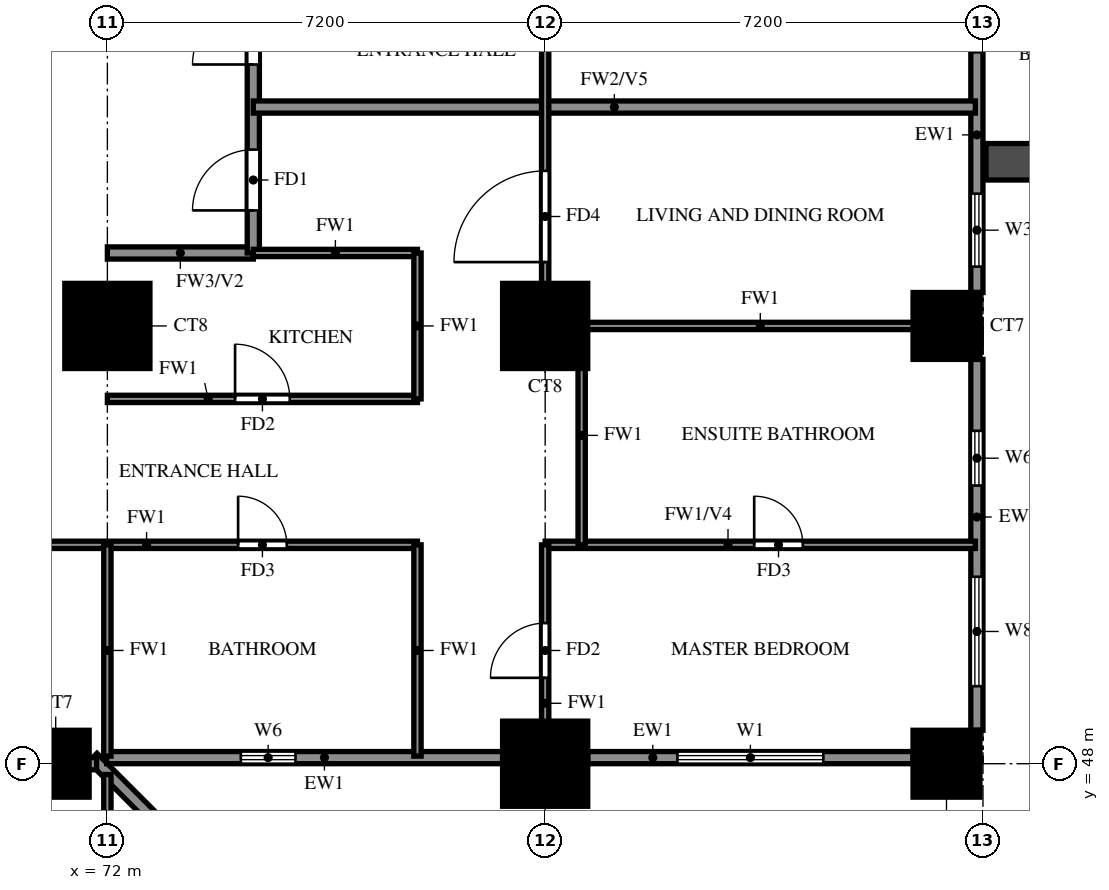
"""IFC4 building model, lengths in metres.
Left out: names, types, materials, properties, quantities, classifications, styles, units other than length and angle.
Written with IfcOpenShell. Run it as: python <this file> out.ifc"""

import sys

from ifc_helpers import new_model, si_unit, direction, frame, frame_2d, origin, origin_2d, place, context, subcontext, project, spatial, rectangle, extrude, source, transform, mapped, element, fill, save


model = new_model("IFC4")
c1 = context("Model", 3, precision=1e-05, world=origin(), true_north=direction((0.0, 1.0)))
c2 = subcontext(c1, "Body", "Model", "MODEL_VIEW")
j1 = project(units=[si_unit("LENGTHUNIT", "METRE"), si_unit("PLANEANGLEUNIT", "RADIAN")], contexts=[c1])
p1 = place(None, origin())
s1 = spatial("IfcSite", under=j1, at=p1, CompositionType="ELEMENT")
p2 = place(p1, origin())
s2 = spatial("IfcBuilding", under=s1, at=p2, CompositionType="ELEMENT")
p3 = place(p2, frame((0.0, 0.0, 34.0)))
s3 = spatial("IfcBuildingStorey", under=s2, at=p3, CompositionType="ELEMENT", Elevation=34.0)
m1 = source(origin(), c2, "Body", "SweptSolid", [
    extrude(rectangle(XDim=1.1, YDim=1.1, at=origin_2d()), origin(), (0.0, 0.0, 1.0), 3.18),
])
p4 = place(p3, frame((71.15, 48.0, 0.0), z_axis=(0.0, 0.0, 1.0), x_axis=(1.0, 0.0, 0.0)))
e1 = element("IfcColumn", 1, at=p4, inside=s3, PredefinedType="COLUMN", context=c2, shape_type="MappedRepresentation", body=[
    mapped(m1, transform((0.0, 0.0, 0.0))),
])
m2 = source(origin(), c2, "Body", "SweptSolid", [
    extrude(rectangle(XDim=1.4, YDim=1.4, at=origin_2d()), origin(), (0.0, 0.0, 1.0), 3.18),
])
p5 = place(p3, frame((79.2, 48.0, 0.0), z_axis=(0.0, 0.0, 1.0), x_axis=(1.0, 0.0, 0.0)))
e2 = element("IfcColumn", 2, at=p5, inside=s3, PredefinedType="COLUMN", context=c2, shape_type="MappedRepresentation", body=[
    mapped(m2, transform((0.0, 0.0, 0.0))),
])
p6 = place(p3, frame((85.8, 48.0, 0.0), z_axis=(0.0, 0.0, 1.0), x_axis=(1.0, 0.0, 0.0)))
e3 = element("IfcColumn", 3, at=p6, inside=s3, PredefinedType="COLUMN", context=c2, shape_type="MappedRepresentation", body=[
    mapped(m1, transform((0.0, 0.0, 0.0))),
])
for number, where, z_axis, x_axis in (
    (4, (72.0, 55.2, 0.0), (0.0, 0.0, 1.0), (1.0, 0.0, 0.0)),
    (5, (79.2, 55.2, 0.0), (0.0, 0.0, 1.0), (1.0, 0.0, 0.0)),
):
    element("IfcColumn", number, at=place(p3, frame(where, z_axis=z_axis, x_axis=x_axis)), inside=s3, PredefinedType="COLUMN", context=c2, shape_type="MappedRepresentation", body=[
        mapped(m2, transform((0.0, 0.0, 0.0))),
    ])
p7 = place(p3, frame((85.8, 55.2, 0.0), z_axis=(0.0, 0.0, 1.0), x_axis=(1.0, 0.0, 0.0)))
e6 = element("IfcColumn", 6, at=p7, inside=s3, PredefinedType="COLUMN", context=c2, shape_type="MappedRepresentation", body=[
    mapped(m1, transform((0.0, 0.0, 0.0))),
])
p8 = place(p3, frame((78.74, 41.118, 0.0), z_axis=(0.0, 0.0, 1.0), x_axis=(-0.707106781187, 0.707106781187, 0.0)))
e7 = element("IfcWall", 7, at=p8, inside=s3, PredefinedType="SOLIDWALL", context=c2, shape_type="SweptSolid", body=[
    extrude(rectangle(XDim=9.874, YDim=0.2, at=frame_2d((4.937, 0.0))), origin(), (0.0, 0.0, 1.0), 3.18),
])
p9 = place(p3, frame((71.989, 48.1, 0.0), z_axis=(0.0, 0.0, 1.0), x_axis=(1.0, 0.0, 0.0)))
e8 = element("IfcWall", 8, at=p9, inside=s3, PredefinedType="SOLIDWALL", context=c2, shape_type="SweptSolid", body=[
    extrude(rectangle(XDim=6.511, YDim=0.2, at=frame_2d((3.256, 0.0))), origin(), (0.0, 0.0, 1.0), 3.18),
])
p10 = place(p9, frame((2.206, 0.0, 1.5)))
e9 = element("IfcOpeningElement", 9, at=p10, cuts=e8, PredefinedType="OPENING", context=c2, shape_type="SweptSolid", body=[
    extrude(rectangle(XDim=0.9, YDim=0.9, at=frame_2d((0.45, 0.45))), frame((0.0, 0.11, 0.0), z_axis=(0.0, -1.0, 0.0), x_axis=(1.0, 0.0, 0.0)), (0.0, 0.0, 1.0), 0.22),
])
p11 = place(p3, frame((79.9, 48.1, 0.0), z_axis=(0.0, 0.0, 1.0), x_axis=(1.0, 0.0, 0.0)))
e10 = element("IfcWall", 10, at=p11, inside=s3, PredefinedType="SOLIDWALL", context=c2, shape_type="SweptSolid", body=[
    extrude(rectangle(XDim=5.35, YDim=0.2, at=frame_2d((2.675, 0.0))), origin(), (0.0, 0.0, 1.0), 3.18),
])
p12 = place(p11, frame((1.475, 0.0, 0.6)))
e11 = element("IfcOpeningElement", 11, at=p12, cuts=e10, PredefinedType="OPENING", context=c2, shape_type="SweptSolid", body=[
    extrude(rectangle(XDim=2.4, YDim=2.4, at=frame_2d((1.2, 1.2))), frame((0.0, 0.11, 0.0), z_axis=(0.0, -1.0, 0.0), x_axis=(1.0, 0.0, 0.0)), (0.0, 0.0, 1.0), 0.22),
])
p13 = place(p3, frame((86.3, 48.55, 0.0), z_axis=(0.0, 0.0, 1.0), x_axis=(0.0, 1.0, 0.0)))
e12 = element("IfcWall", 12, at=p13, inside=s3, PredefinedType="SOLIDWALL", context=c2, shape_type="SweptSolid", body=[
    extrude(rectangle(XDim=6.1, YDim=0.2, at=frame_2d((3.05, 0.0))), origin(), (0.0, 0.0, 1.0), 3.18),
])
p14 = place(p13, frame((0.725, 0.0, 0.6)))
e13 = element("IfcOpeningElement", 13, at=p14, cuts=e12, PredefinedType="OPENING", context=c2, shape_type="SweptSolid", body=[
    extrude(rectangle(XDim=1.8, YDim=2.4, at=frame_2d((0.9, 1.2))), frame((0.0, 0.11, 0.0), z_axis=(0.0, -1.0, 0.0), x_axis=(1.0, 0.0, 0.0)), (0.0, 0.0, 1.0), 0.22),
])
p15 = place(p13, frame((4.025, 0.0, 1.5)))
e14 = element("IfcOpeningElement", 14, at=p15, cuts=e12, PredefinedType="OPENING", context=c2, shape_type="SweptSolid", body=[
    extrude(rectangle(XDim=0.9, YDim=0.9, at=frame_2d((0.45, 0.45))), frame((0.0, 0.11, 0.0), z_axis=(0.0, -1.0, 0.0), x_axis=(1.0, 0.0, 0.0)), (0.0, 0.0, 1.0), 0.22),
])
p16 = place(p3, frame((86.3, 55.75, 0.0), z_axis=(0.0, 0.0, 1.0), x_axis=(0.0, 1.0, 0.0)))
e15 = element("IfcWall", 15, at=p16, inside=s3, PredefinedType="SOLIDWALL", context=c2, shape_type="SweptSolid", body=[
    extrude(rectangle(XDim=6.1, YDim=0.2, at=frame_2d((3.05, 0.0))), origin(), (0.0, 0.0, 1.0), 3.18),
])
p17 = place(p16, frame((3.95, 0.0, 0.0)))
e16 = element("IfcOpeningElement", 16, at=p17, cuts=e15, PredefinedType="OPENING", context=c2, shape_type="SweptSolid", body=[
    extrude(rectangle(XDim=1.8, YDim=2.4, at=frame_2d((0.9, 1.2))), frame((0.0, 0.11, 0.0), z_axis=(0.0, -1.0, 0.0), x_axis=(1.0, 0.0, 0.0)), (0.0, 0.0, 1.0), 0.22),
])
p18 = place(p16, frame((0.425, 0.0, 0.6)))
e17 = element("IfcOpeningElement", 17, at=p18, cuts=e15, PredefinedType="OPENING", context=c2, shape_type="SweptSolid", body=[
    extrude(rectangle(XDim=1.2, YDim=2.4, at=frame_2d((0.6, 1.2))), frame((0.0, 0.11, 0.0), z_axis=(0.0, -1.0, 0.0), x_axis=(1.0, 0.0, 0.0)), (0.0, 0.0, 1.0), 0.22),
])
p19 = place(p3, frame((86.45, 57.9, 0.0), z_axis=(0.0, 0.0, 1.0), x_axis=(1.0, 0.0, 0.0)))
e18 = element("IfcWall", 18, at=p19, inside=s3, PredefinedType="SOLIDWALL", context=c2, shape_type="SweptSolid", body=[
    extrude(rectangle(XDim=2.65, YDim=0.6, at=frame_2d((1.325, 0.0))), origin(), (0.0, 0.0, 1.0), 2.85),
])
p20 = place(p3, frame((72.0, 56.4, 0.0), z_axis=(0.0, 0.0, 1.0), x_axis=(1.0, 0.0, 0.0)))
e19 = element("IfcWall", 19, at=p20, inside=s3, PredefinedType="SOLIDWALL", context=c2, shape_type="SweptSolid", body=[
    extrude(rectangle(XDim=2.4, YDim=0.2, at=frame_2d((1.2, 0.0))), origin(), (0.0, 0.0, 1.0), 3.18),
])
p21 = place(p3, frame((74.4, 56.4, 0.0), z_axis=(0.0, 0.0, 1.0), x_axis=(0.0, 1.0, 0.0)))
e20 = element("IfcWall", 20, at=p21, inside=s3, PredefinedType="SOLIDWALL", context=c2, shape_type="SweptSolid", body=[
    extrude(rectangle(XDim=9.6, YDim=0.2, at=frame_2d((4.8, 0.0))), origin(), (0.0, 0.0, 1.0), 3.18),
])
p22 = place(p21, frame((0.7, 0.0, 0.0)))
e21 = element("IfcOpeningElement", 21, at=p22, cuts=e20, PredefinedType="OPENING", context=c2, shape_type="SweptSolid", body=[
    extrude(rectangle(XDim=1.0, YDim=2.1, at=frame_2d((0.5, 1.05))), frame((0.0, 0.11, 0.0), z_axis=(0.0, -1.0, 0.0), x_axis=(1.0, 0.0, 0.0)), (0.0, 0.0, 1.0), 0.22),
])
p23 = place(p21, frame((3.1, 0.0, 0.0)))
e22 = element("IfcOpeningElement", 22, at=p23, cuts=e20, PredefinedType="OPENING", context=c2, shape_type="SweptSolid", body=[
    extrude(rectangle(XDim=1.0, YDim=2.1, at=frame_2d((0.5, 1.05))), frame((0.0, 0.11, 0.0), z_axis=(0.0, -1.0, 0.0), x_axis=(1.0, 0.0, 0.0)), (0.0, 0.0, 1.0), 0.22),
])
p24 = place(p3, frame((67.2, 48.0, 0.0), z_axis=(0.0, 0.0, 1.0), x_axis=(1.0, 0.0, 0.0)))
e23 = element("IfcWall", 23, at=p24, inside=s3, PredefinedType="SOLIDWALL", context=c2, shape_type="SweptSolid", body=[
    extrude(rectangle(XDim=4.623, YDim=0.2, at=frame_2d((2.312, 0.0))), origin(), (0.0, 0.0, 1.0), 3.18),
])
p25 = place(p3, frame((74.4, 58.8, 0.0), z_axis=(0.0, 0.0, 1.0), x_axis=(1.0, 0.0, 0.0)))
e24 = element("IfcWall", 24, at=p25, inside=s3, PredefinedType="SOLIDWALL", context=c2, shape_type="SweptSolid", body=[
    extrude(rectangle(XDim=11.875, YDim=0.2, at=frame_2d((5.938, 0.0))), origin(), (0.0, 0.0, 1.0), 2.28),
])
p26 = place(p3, frame((67.2, 51.6, 0.0), z_axis=(0.0, 0.0, 1.0), x_axis=(1.0, 0.0, 0.0)))
e25 = element("IfcWall", 25, at=p26, inside=s3, PredefinedType="PARTITIONING", context=c2, shape_type="SweptSolid", body=[
    extrude(rectangle(XDim=9.9, YDim=0.12, at=frame_2d((4.95, 0.0))), origin(), (0.0, 0.0, 1.0), 3.18),
])
p27 = place(p26, frame((6.95, 0.0, 0.0)))
e26 = element("IfcOpeningElement", 26, at=p27, cuts=e25, PredefinedType="OPENING", context=c2, shape_type="SweptSolid", body=[
    extrude(rectangle(XDim=0.8, YDim=2.1, at=frame_2d((0.4, 1.05))), frame((0.0, 0.07, 0.0), z_axis=(0.0, -1.0, 0.0), x_axis=(1.0, 0.0, 0.0)), (0.0, 0.0, 1.0), 0.14),
])
p28 = place(p26, frame((1.95, 0.0, 0.0)))
e27 = element("IfcOpeningElement", 27, at=p28, cuts=e25, PredefinedType="OPENING", context=c2, shape_type="SweptSolid", body=[
    extrude(rectangle(XDim=0.9, YDim=2.1, at=frame_2d((0.45, 1.05))), frame((0.0, 0.07, 0.0), z_axis=(0.0, -1.0, 0.0), x_axis=(1.0, 0.0, 0.0)), (0.0, 0.0, 1.0), 0.14),
])
p29 = place(p3, frame((79.2, 51.6, 0.0), z_axis=(0.0, 0.0, 1.0), x_axis=(1.0, 0.0, 0.0)))
e28 = element("IfcWall", 28, at=p29, inside=s3, PredefinedType="PARTITIONING", context=c2, shape_type="SweptSolid", body=[
    extrude(rectangle(XDim=7.075, YDim=0.12, at=frame_2d((3.538, 0.0))), origin(), (0.0, 0.0, 1.0), 2.28),
])
p30 = place(p29, frame((3.438, 0.0, 0.0)))
e29 = element("IfcOpeningElement", 29, at=p30, cuts=e28, PredefinedType="OPENING", context=c2, shape_type="SweptSolid", body=[
    extrude(rectangle(XDim=0.8, YDim=2.1, at=frame_2d((0.4, 1.05))), frame((0.0, 0.07, 0.0), z_axis=(0.0, -1.0, 0.0), x_axis=(1.0, 0.0, 0.0)), (0.0, 0.0, 1.0), 0.14),
])
p31 = place(p3, frame((72.0, 54.0, 0.0), z_axis=(0.0, 0.0, 1.0), x_axis=(1.0, 0.0, 0.0)))
e30 = element("IfcWall", 30, at=p31, inside=s3, PredefinedType="PARTITIONING", context=c2, shape_type="SweptSolid", body=[
    extrude(rectangle(XDim=5.1, YDim=0.12, at=frame_2d((2.55, 0.0))), origin(), (0.0, 0.0, 1.0), 3.18),
])
p32 = place(p31, frame((2.1, 0.0, 0.0)))
e31 = element("IfcOpeningElement", 31, at=p32, cuts=e30, PredefinedType="OPENING", context=c2, shape_type="SweptSolid", body=[
    extrude(rectangle(XDim=0.9, YDim=2.1, at=frame_2d((0.45, 1.05))), frame((0.0, 0.07, 0.0), z_axis=(0.0, -1.0, 0.0), x_axis=(1.0, 0.0, 0.0)), (0.0, 0.0, 1.0), 0.14),
])
p33 = place(p3, frame((79.2, 55.2, 0.0), z_axis=(0.0, 0.0, 1.0), x_axis=(1.0, 0.0, 0.0)))
e32 = element("IfcWall", 32, at=p33, inside=s3, PredefinedType="PARTITIONING", context=c2, shape_type="SweptSolid", body=[
    extrude(rectangle(XDim=7.075, YDim=0.12, at=frame_2d((3.538, 0.0))), origin(), (0.0, 0.0, 1.0), 3.18),
])
p34 = place(p3, frame((74.4, 56.4, 0.0), z_axis=(0.0, 0.0, 1.0), x_axis=(1.0, 0.0, 0.0)))
e33 = element("IfcWall", 33, at=p34, inside=s3, PredefinedType="PARTITIONING", context=c2, shape_type="SweptSolid", body=[
    extrude(rectangle(XDim=2.7, YDim=0.12, at=frame_2d((1.35, 0.0))), origin(), (0.0, 0.0, 1.0), 3.18),
])
p35 = place(p3, frame((72.0, 33.725, 0.0), z_axis=(0.0, 0.0, 1.0), x_axis=(0.0, 1.0, 0.0)))
e34 = element("IfcWall", 34, at=p35, inside=s3, PredefinedType="PARTITIONING", context=c2, shape_type="SweptSolid", body=[
    extrude(rectangle(XDim=14.098, YDim=0.12, at=frame_2d((7.049, 0.0))), origin(), (0.0, 0.0, 1.0), 2.28),
])
p36 = place(p35, frame((10.075, 0.0, 0.0)))
e35 = element("IfcOpeningElement", 35, at=p36, cuts=e34, PredefinedType="OPENING", context=c2, shape_type="SweptSolid", body=[
    extrude(rectangle(XDim=0.9, YDim=2.1, at=frame_2d((0.45, 1.05))), frame((0.0, 0.07, 0.0), z_axis=(0.0, -1.0, 0.0), x_axis=(1.0, 0.0, 0.0)), (0.0, 0.0, 1.0), 0.14),
])
for number, where, z_axis, x_axis in (
    (36, (72.0, 48.125, 0.0), (0.0, 0.0, 1.0), (0.0, 1.0, 0.0)),
    (37, (77.1, 48.125, 0.0), (0.0, 0.0, 1.0), (0.0, 1.0, 0.0)),
):
    element("IfcWall", number, at=place(p3, frame(where, z_axis=z_axis, x_axis=x_axis)), inside=s3, PredefinedType="PARTITIONING", context=c2, shape_type="SweptSolid", body=[
        extrude(rectangle(XDim=3.475, YDim=0.12, at=frame_2d((1.738, 0.0))), origin(), (0.0, 0.0, 1.0), 3.18),
    ])
p37 = place(p3, frame((77.1, 54.0, 0.0), z_axis=(0.0, 0.0, 1.0), x_axis=(0.0, 1.0, 0.0)))
e38 = element("IfcWall", 38, at=p37, inside=s3, PredefinedType="PARTITIONING", context=c2, shape_type="SweptSolid", body=[
    extrude(rectangle(XDim=2.4, YDim=0.12, at=frame_2d((1.2, 0.0))), origin(), (0.0, 0.0, 1.0), 3.18),
])
p38 = place(p3, frame((79.2, 48.125, 0.0), z_axis=(0.0, 0.0, 1.0), x_axis=(0.0, 1.0, 0.0)))
e39 = element("IfcWall", 39, at=p38, inside=s3, PredefinedType="PARTITIONING", context=c2, shape_type="SweptSolid", body=[
    extrude(rectangle(XDim=3.475, YDim=0.12, at=frame_2d((1.738, 0.0))), origin(), (0.0, 0.0, 1.0), 3.18),
])
p39 = place(p38, frame((1.288, 0.0, 0.0)))
e40 = element("IfcOpeningElement", 40, at=p39, cuts=e39, PredefinedType="OPENING", context=c2, shape_type="SweptSolid", body=[
    extrude(rectangle(XDim=0.9, YDim=2.1, at=frame_2d((0.45, 1.05))), frame((0.0, 0.07, 0.0), z_axis=(0.0, -1.0, 0.0), x_axis=(1.0, 0.0, 0.0)), (0.0, 0.0, 1.0), 0.14),
])
p40 = place(p3, frame((79.2, 55.2, 0.0), z_axis=(0.0, 0.0, 1.0), x_axis=(0.0, 1.0, 0.0)))
e41 = element("IfcWall", 41, at=p40, inside=s3, PredefinedType="PARTITIONING", context=c2, shape_type="SweptSolid", body=[
    extrude(rectangle(XDim=18.0, YDim=0.12, at=frame_2d((9.0, 0.0))), origin(), (0.0, 0.0, 1.0), 3.18),
])
p41 = place(p40, frame((1.05, 0.0, 0.0)))
e42 = element("IfcOpeningElement", 42, at=p41, cuts=e41, PredefinedType="OPENING", context=c2, shape_type="SweptSolid", body=[
    extrude(rectangle(XDim=1.5, YDim=2.1, at=frame_2d((0.75, 1.05))), frame((0.0, 0.07, 0.0), z_axis=(0.0, -1.0, 0.0), x_axis=(1.0, 0.0, 0.0)), (0.0, 0.0, 1.0), 0.14),
])
p42 = place(p40, frame((4.95, 0.0, 0.0)))
e43 = element("IfcOpeningElement", 43, at=p42, cuts=e41, PredefinedType="OPENING", context=c2, shape_type="SweptSolid", body=[
    extrude(rectangle(XDim=0.9, YDim=2.1, at=frame_2d((0.45, 1.05))), frame((0.0, 0.07, 0.0), z_axis=(0.0, -1.0, 0.0), x_axis=(1.0, 0.0, 0.0)), (0.0, 0.0, 1.0), 0.14),
])
p43 = place(p40, frame((8.55, 0.0, 0.0)))
e44 = element("IfcOpeningElement", 44, at=p43, cuts=e41, PredefinedType="OPENING", context=c2, shape_type="SweptSolid", body=[
    extrude(rectangle(XDim=0.9, YDim=2.1, at=frame_2d((0.45, 1.05))), frame((0.0, 0.07, 0.0), z_axis=(0.0, -1.0, 0.0), x_axis=(1.0, 0.0, 0.0)), (0.0, 0.0, 1.0), 0.14),
])
p44 = place(p40, frame((12.15, 0.0, 0.0)))
e45 = element("IfcOpeningElement", 45, at=p44, cuts=e41, PredefinedType="OPENING", context=c2, shape_type="SweptSolid", body=[
    extrude(rectangle(XDim=0.9, YDim=2.1, at=frame_2d((0.45, 1.05))), frame((0.0, 0.07, 0.0), z_axis=(0.0, -1.0, 0.0), x_axis=(1.0, 0.0, 0.0)), (0.0, 0.0, 1.0), 0.14),
])
p45 = place(p40, frame((15.75, 0.0, 0.0)))
e46 = element("IfcOpeningElement", 46, at=p45, cuts=e41, PredefinedType="OPENING", context=c2, shape_type="SweptSolid", body=[
    extrude(rectangle(XDim=0.9, YDim=2.1, at=frame_2d((0.45, 1.05))), frame((0.0, 0.07, 0.0), z_axis=(0.0, -1.0, 0.0), x_axis=(1.0, 0.0, 0.0)), (0.0, 0.0, 1.0), 0.14),
])
p46 = place(p3, frame((79.8, 51.6, 0.0), z_axis=(0.0, 0.0, 1.0), x_axis=(0.0, 1.0, 0.0)))
e47 = element("IfcWall", 47, at=p46, inside=s3, PredefinedType="PARTITIONING", context=c2, shape_type="SweptSolid", body=[
    extrude(rectangle(XDim=3.6, YDim=0.12, at=frame_2d((1.8, 0.0))), origin(), (0.0, 0.0, 1.0), 3.18),
])
p47 = place(p10, origin())
e48 = element("IfcWindow", 48, at=p47, inside=s3, PartitioningType="SINGLE_PANEL", PredefinedType="WINDOW", context=c2, shape_type="SweptSolid", body=[
    extrude(rectangle(XDim=0.9, YDim=0.9, at=frame_2d((0.45, 0.45))), frame((0.0, 0.03, 0.0), z_axis=(0.0, -1.0, 0.0), x_axis=(1.0, 0.0, 0.0)), (0.0, 0.0, 1.0), 0.06),
])
fill(e9, e48)
p48 = place(p12, origin())
e49 = element("IfcWindow", 49, at=p48, inside=s3, PartitioningType="DOUBLE_PANEL_VERTICAL", PredefinedType="WINDOW", context=c2, shape_type="SweptSolid", body=[
    extrude(rectangle(XDim=2.4, YDim=2.4, at=frame_2d((1.2, 1.2))), frame((0.0, 0.03, 0.0), z_axis=(0.0, -1.0, 0.0), x_axis=(1.0, 0.0, 0.0)), (0.0, 0.0, 1.0), 0.06),
])
fill(e11, e49)
p49 = place(p14, origin())
e50 = element("IfcWindow", 50, at=p49, inside=s3, PartitioningType="DOUBLE_PANEL_VERTICAL", PredefinedType="WINDOW", context=c2, shape_type="SweptSolid", body=[
    extrude(rectangle(XDim=1.8, YDim=2.4, at=frame_2d((0.9, 1.2))), frame((0.0, 0.03, 0.0), z_axis=(0.0, -1.0, 0.0), x_axis=(1.0, 0.0, 0.0)), (0.0, 0.0, 1.0), 0.06),
])
fill(e13, e50)
p50 = place(p15, origin())
e51 = element("IfcWindow", 51, at=p50, inside=s3, PartitioningType="SINGLE_PANEL", PredefinedType="WINDOW", context=c2, shape_type="SweptSolid", body=[
    extrude(rectangle(XDim=0.9, YDim=0.9, at=frame_2d((0.45, 0.45))), frame((0.0, 0.03, 0.0), z_axis=(0.0, -1.0, 0.0), x_axis=(1.0, 0.0, 0.0)), (0.0, 0.0, 1.0), 0.06),
])
fill(e14, e51)
p51 = place(p17, origin())
e52 = element("IfcDoor", 52, at=p51, inside=s3, OperationType="DOUBLE_DOOR_SLIDING", PredefinedType="DOOR", context=c2, shape_type="SweptSolid", body=[
    extrude(rectangle(XDim=1.8, YDim=2.4, at=frame_2d((0.9, 1.2))), frame((0.0, 0.025, 0.0), z_axis=(0.0, -1.0, 0.0), x_axis=(1.0, 0.0, 0.0)), (0.0, 0.0, 1.0), 0.05),
])
fill(e16, e52)
p52 = place(p18, origin())
e53 = element("IfcWindow", 53, at=p52, inside=s3, PartitioningType="SINGLE_PANEL", PredefinedType="WINDOW", context=c2, shape_type="SweptSolid", body=[
    extrude(rectangle(XDim=1.2, YDim=2.4, at=frame_2d((0.6, 1.2))), frame((0.0, 0.03, 0.0), z_axis=(0.0, -1.0, 0.0), x_axis=(1.0, 0.0, 0.0)), (0.0, 0.0, 1.0), 0.06),
])
fill(e17, e53)
p53 = place(p22, origin())
e54 = element("IfcDoor", 54, at=p53, inside=s3, OperationType="SINGLE_SWING_RIGHT", PredefinedType="DOOR", context=c2, shape_type="SweptSolid", body=[
    extrude(rectangle(XDim=1.0, YDim=2.1, at=frame_2d((0.5, 1.05))), frame((0.0, 0.025, 0.0), z_axis=(0.0, -1.0, 0.0), x_axis=(1.0, 0.0, 0.0)), (0.0, 0.0, 1.0), 0.05),
])
fill(e21, e54)
p54 = place(p39, origin())
e55 = element("IfcDoor", 55, at=p54, inside=s3, OperationType="SINGLE_SWING_LEFT", PredefinedType="DOOR", context=c2, shape_type="SweptSolid", body=[
    extrude(rectangle(XDim=0.9, YDim=2.1, at=frame_2d((0.45, 1.05))), frame((0.0, 0.025, 0.0), z_axis=(0.0, -1.0, 0.0), x_axis=(1.0, 0.0, 0.0)), (0.0, 0.0, 1.0), 0.05),
])
fill(e40, e55)
p55 = place(p30, origin())
e56 = element("IfcDoor", 56, at=p55, inside=s3, OperationType="SINGLE_SWING_LEFT", PredefinedType="DOOR", context=c2, shape_type="SweptSolid", body=[
    extrude(rectangle(XDim=0.8, YDim=2.1, at=frame_2d((0.4, 1.05))), frame((0.0, 0.025, 0.0), z_axis=(0.0, -1.0, 0.0), x_axis=(1.0, 0.0, 0.0)), (0.0, 0.0, 1.0), 0.05),
])
fill(e29, e56)
p56 = place(p41, origin())
e57 = element("IfcDoor", 57, at=p56, inside=s3, OperationType="SINGLE_SWING_RIGHT", PredefinedType="DOOR", context=c2, shape_type="SweptSolid", body=[
    extrude(rectangle(XDim=1.5, YDim=2.1, at=frame_2d((0.75, 1.05))), frame((0.0, 0.025, 0.0), z_axis=(0.0, -1.0, 0.0), x_axis=(1.0, 0.0, 0.0)), (0.0, 0.0, 1.0), 0.05),
])
fill(e42, e57)
p57 = place(p27, origin())
e58 = element("IfcDoor", 58, at=p57, inside=s3, OperationType="SINGLE_SWING_LEFT", PredefinedType="DOOR", context=c2, shape_type="SweptSolid", body=[
    extrude(rectangle(XDim=0.8, YDim=2.1, at=frame_2d((0.4, 1.05))), frame((0.0, 0.025, 0.0), z_axis=(0.0, -1.0, 0.0), x_axis=(1.0, 0.0, 0.0)), (0.0, 0.0, 1.0), 0.05),
])
fill(e26, e58)
p58 = place(p32, origin())
e59 = element("IfcDoor", 59, at=p58, inside=s3, OperationType="SINGLE_SWING_LEFT", PredefinedType="DOOR", context=c2, shape_type="SweptSolid", body=[
    extrude(rectangle(XDim=0.9, YDim=2.1, at=frame_2d((0.45, 1.05))), frame((0.0, 0.025, 0.0), z_axis=(0.0, -1.0, 0.0), x_axis=(1.0, 0.0, 0.0)), (0.0, 0.0, 1.0), 0.05),
])
fill(e31, e59)
p59 = place(p23, origin())
e60 = element("IfcDoor", 60, at=p59, inside=s3, OperationType="SINGLE_SWING_LEFT", PredefinedType="DOOR", context=c2, shape_type="SweptSolid", body=[
    extrude(rectangle(XDim=1.0, YDim=2.1, at=frame_2d((0.5, 1.05))), frame((0.0, 0.025, 0.0), z_axis=(0.0, -1.0, 0.0), x_axis=(1.0, 0.0, 0.0)), (0.0, 0.0, 1.0), 0.05),
])
fill(e22, e60)
save(model, sys.argv[1])
